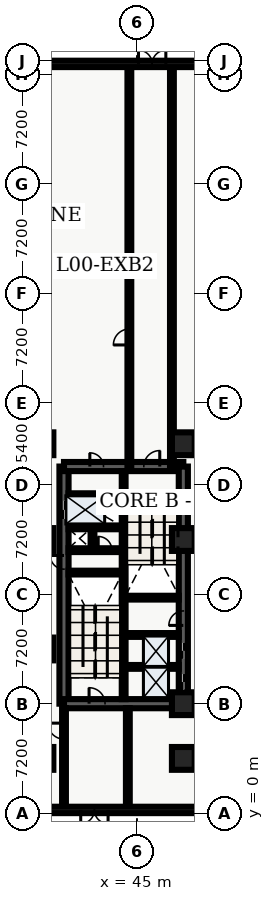
"""IFC4 building model, lengths in metres.
Left out: names, types, materials, properties, quantities, classifications, styles, units other than length and angle.
Written with IfcOpenShell. Run it as: python <this file> out.ifc"""

import sys

from ifc_helpers import new_model, entity, si_unit, converted_unit, direction, frame, origin_with_axes, origin_2d_with_axis, place, context, subcontext, project, spatial, polyline, rectangle, outline, extrude, element, fill, save


model = new_model("IFC4")
c1 = context("Model", 3, precision=1e-05, world=origin_with_axes(), true_north=direction((0.0, 1.0)))
c2 = subcontext(c1, "Body", "Model", "MODEL_VIEW")
j1 = project(units=[si_unit("LENGTHUNIT", "METRE"), converted_unit("PLANEANGLEUNIT", "DEGREE", entity("IfcPlaneAngleMeasure", 0.017), si_unit("PLANEANGLEUNIT", "RADIAN"), dimensions=[0, 0, 0, 0, 0, 0, 0])], contexts=[c1])
p1 = place(None, origin_with_axes())
s1 = spatial("IfcSite", under=j1, at=p1, CompositionType="ELEMENT")
p2 = place(p1, origin_with_axes())
s2 = spatial("IfcBuilding", under=s1, at=p2, CompositionType="ELEMENT")
p3 = place(p2, origin_with_axes())
s3 = spatial("IfcBuildingStorey", under=s2, at=p3, CompositionType="ELEMENT", Elevation=0.0)
p4 = place(p3, frame((40.2, 7.2, 0.0), z_axis=(0.0, 0.0, 1.0), x_axis=(0.0, 1.0, 0.0)))
e1 = element("IfcWall", 1, at=p4, inside=s3, PredefinedType="SHEAR", context=c2, shape_type="SweptSolid", body=[
    extrude(outline(polyline([(0.0, -0.3), (15.6, -0.3), (15.6, 0.3), (0.0, 0.3), (0.0, -0.3)])), origin_with_axes(), (0.0, 0.0, 1.0), 5.46),
])
p5 = place(p4, frame((12.75, 0.0, 0.0), z_axis=(0.0, 0.0, 1.0), x_axis=(1.0, 0.0, 0.0)))
e2 = element("IfcOpeningElement", 2, at=p5, cuts=e1, PredefinedType="OPENING", context=c2, shape_type="SweptSolid", body=[
    extrude(rectangle(XDim=1.2, YDim=0.62, at=origin_2d_with_axis()), origin_with_axes(), (0.0, 0.0, 1.0), 2.15),
])
p6 = place(p4, frame((9.3, 0.0, 0.0), z_axis=(0.0, 0.0, 1.0), x_axis=(1.0, 0.0, 0.0)))
e3 = element("IfcOpeningElement", 3, at=p6, cuts=e1, PredefinedType="OPENING", context=c2, shape_type="SweptSolid", body=[
    extrude(rectangle(XDim=0.9, YDim=0.62, at=origin_2d_with_axis()), origin_with_axes(), (0.0, 0.0, 1.0), 2.15),
])
p7 = place(p3, frame((40.2, 7.2, 0.0), z_axis=(0.0, 0.0, 1.0), x_axis=(1.0, 0.0, 0.0)))
e4 = element("IfcWall", 4, at=p7, inside=s3, PredefinedType="SHEAR", context=c2, shape_type="SweptSolid", body=[
    extrude(outline(polyline([(0.0, -0.3), (7.85, -0.3), (7.85, 0.3), (0.0, 0.3), (0.0, -0.3)])), origin_with_axes(), (0.0, 0.0, 1.0), 5.46),
])
p8 = place(p7, frame((2.175, 0.0, 0.0), z_axis=(0.0, 0.0, 1.0), x_axis=(1.0, 0.0, 0.0)))
e5 = element("IfcOpeningElement", 5, at=p8, cuts=e4, PredefinedType="OPENING", context=c2, shape_type="SweptSolid", body=[
    extrude(rectangle(XDim=1.05, YDim=0.62, at=origin_2d_with_axis()), origin_with_axes(), (0.0, 0.0, 1.0), 2.15),
])
p9 = place(p3, frame((40.2, 22.8, 0.0), z_axis=(0.0, 0.0, 1.0), x_axis=(1.0, 0.0, 0.0)))
e6 = element("IfcWall", 6, at=p9, inside=s3, PredefinedType="SHEAR", context=c2, shape_type="SweptSolid", body=[
    extrude(outline(polyline([(0.0, -0.3), (7.85, -0.3), (7.85, 0.3), (0.0, 0.3), (0.0, -0.3)])), origin_with_axes(), (0.0, 0.0, 1.0), 5.46),
])
p10 = place(p9, frame((5.775, 0.0, 0.0), z_axis=(0.0, 0.0, 1.0), x_axis=(1.0, 0.0, 0.0)))
e7 = element("IfcOpeningElement", 7, at=p10, cuts=e6, PredefinedType="OPENING", context=c2, shape_type="SweptSolid", body=[
    extrude(rectangle(XDim=1.05, YDim=0.62, at=origin_2d_with_axis()), origin_with_axes(), (0.0, 0.0, 1.0), 2.15),
])
p11 = place(p9, frame((2.15, 0.0, 0.0), z_axis=(0.0, 0.0, 1.0), x_axis=(1.0, 0.0, 0.0)))
e8 = element("IfcOpeningElement", 8, at=p11, cuts=e6, PredefinedType="OPENING", context=c2, shape_type="SweptSolid", body=[
    extrude(rectangle(XDim=0.9, YDim=0.62, at=origin_2d_with_axis()), origin_with_axes(), (0.0, 0.0, 1.0), 2.15),
])
p12 = place(p3, frame((48.05, 7.2, 0.0), z_axis=(0.0, 0.0, 1.0), x_axis=(0.0, 1.0, 0.0)))
e9 = element("IfcWall", 9, at=p12, inside=s3, PredefinedType="SHEAR", context=c2, shape_type="SweptSolid", body=[
    extrude(outline(polyline([(0.0, -0.3), (15.6, -0.3), (15.6, 0.3), (0.0, 0.3), (0.0, -0.3)])), origin_with_axes(), (0.0, 0.0, 1.0), 5.46),
])
p13 = place(p12, frame((1.425, 0.0, 0.0), z_axis=(0.0, 0.0, 1.0), x_axis=(1.0, 0.0, 0.0)))
e10 = element("IfcOpeningElement", 10, at=p13, cuts=e9, PredefinedType="OPENING", context=c2, shape_type="SweptSolid", body=[
    extrude(rectangle(XDim=1.05, YDim=0.62, at=origin_2d_with_axis()), origin_with_axes(), (0.0, 0.0, 1.0), 2.15),
])
p14 = place(p12, frame((3.475, 0.0, 0.0), z_axis=(0.0, 0.0, 1.0), x_axis=(1.0, 0.0, 0.0)))
e11 = element("IfcOpeningElement", 11, at=p14, cuts=e9, PredefinedType="OPENING", context=c2, shape_type="SweptSolid", body=[
    extrude(rectangle(XDim=1.05, YDim=0.62, at=origin_2d_with_axis()), origin_with_axes(), (0.0, 0.0, 1.0), 2.15),
])
p15 = place(p12, frame((5.625, 0.0, 0.0), z_axis=(0.0, 0.0, 1.0), x_axis=(1.0, 0.0, 0.0)))
e12 = element("IfcOpeningElement", 12, at=p15, cuts=e9, PredefinedType="OPENING", context=c2, shape_type="SweptSolid", body=[
    extrude(rectangle(XDim=0.95, YDim=0.62, at=origin_2d_with_axis()), origin_with_axes(), (0.0, 0.0, 1.0), 2.15),
])
p16 = place(p3, frame((44.125, 7.5, 0.0), z_axis=(0.0, 0.0, 1.0), x_axis=(0.0, 1.0, 0.0)))
e13 = element("IfcWall", 13, at=p16, inside=s3, PredefinedType="SHEAR", context=c2, shape_type="SweptSolid", body=[
    extrude(outline(polyline([(0.0, -0.125), (15.0, -0.125), (15.0, 0.125), (0.0, 0.125), (0.0, -0.125)])), origin_with_axes(), (0.0, 0.0, 1.0), 5.46),
])
for number, where, z_axis, x_axis in (
    (14, (40.5, 15.825, 0.0), (0.0, 0.0, 1.0), (1.0, 0.0, 0.0)),
    (15, (44.25, 14.175, 0.0), (0.0, 0.0, 1.0), (1.0, 0.0, 0.0)),
):
    element("IfcWall", number, at=place(p3, frame(where, z_axis=z_axis, x_axis=x_axis)), inside=s3, PredefinedType="SHEAR", context=c2, shape_type="SweptSolid", body=[
        extrude(outline(polyline([(0.0, -0.125), (3.5, -0.125), (3.5, 0.125), (0.0, 0.125), (0.0, -0.125)])), origin_with_axes(), (0.0, 0.0, 1.0), 5.46),
    ])
p17 = place(p3, frame((40.5, 17.3, 0.0), z_axis=(0.0, 0.0, 1.0), x_axis=(1.0, 0.0, 0.0)))
e16 = element("IfcWall", 16, at=p17, inside=s3, PredefinedType="SOLIDWALL", context=c2, shape_type="SweptSolid", body=[
    extrude(outline(polyline([(0.0, -0.125), (3.5, -0.125), (3.5, 0.125), (0.0, 0.125), (0.0, -0.125)])), origin_with_axes(), (0.0, 0.0, 1.0), 3.6),
])
p18 = place(p17, frame((2.4, 0.0, 0.0), z_axis=(0.0, 0.0, 1.0), x_axis=(1.0, 0.0, 0.0)))
e17 = element("IfcOpeningElement", 17, at=p18, cuts=e16, PredefinedType="OPENING", context=c2, shape_type="SweptSolid", body=[
    extrude(rectangle(XDim=0.9, YDim=0.27, at=origin_2d_with_axis()), origin_with_axes(), (0.0, 0.0, 1.0), 2.15),
])
p19 = place(p3, frame((40.5, 18.8, 0.0), z_axis=(0.0, 0.0, 1.0), x_axis=(1.0, 0.0, 0.0)))
e18 = element("IfcWall", 18, at=p19, inside=s3, PredefinedType="SOLIDWALL", context=c2, shape_type="SweptSolid", body=[
    extrude(outline(polyline([(0.0, -0.125), (3.5, -0.125), (3.5, 0.125), (0.0, 0.125), (0.0, -0.125)])), origin_with_axes(), (0.0, 0.0, 1.0), 3.6),
])
p20 = place(p3, frame((42.075, 17.43, 0.0), z_axis=(0.0, 0.0, 1.0), x_axis=(0.0, 1.0, 0.0)))
e19 = element("IfcWall", 19, at=p20, inside=s3, PredefinedType="SOLIDWALL", context=c2, shape_type="SweptSolid", body=[
    extrude(outline(polyline([(0.0, -0.125), (1.24, -0.125), (1.24, 0.125), (0.0, 0.125), (0.0, -0.125)])), origin_with_axes(), (0.0, 0.0, 1.0), 3.6),
])
p21 = place(p3, frame((40.2, 0.42, 0.0), z_axis=(0.0, 0.0, 1.0), x_axis=(0.0, 1.0, 0.0)))
e20 = element("IfcWall", 20, at=p21, inside=s3, PredefinedType="SOLIDWALL", context=c2, shape_type="SweptSolid", body=[
    extrude(outline(polyline([(0.0, -0.125), (6.48, -0.125), (6.48, 0.125), (0.0, 0.125), (0.0, -0.125)])), origin_with_axes(), (0.0, 0.0, 1.0), 3.6),
])
p22 = place(p21, frame((4.975, 0.0, 0.0), z_axis=(0.0, 0.0, 1.0), x_axis=(1.0, 0.0, 0.0)))
e21 = element("IfcOpeningElement", 21, at=p22, cuts=e20, PredefinedType="OPENING", context=c2, shape_type="SweptSolid", body=[
    extrude(rectangle(XDim=1.05, YDim=0.27, at=origin_2d_with_axis()), origin_with_axes(), (0.0, 0.0, 1.0), 2.15),
])
p23 = place(p3, frame((44.4, 0.42, 0.0), z_axis=(0.0, 0.0, 1.0), x_axis=(0.0, 1.0, 0.0)))
e22 = element("IfcWall", 22, at=p23, inside=s3, PredefinedType="SOLIDWALL", context=c2, shape_type="SweptSolid", body=[
    extrude(outline(polyline([(0.0, -0.125), (6.48, -0.125), (6.48, 0.125), (0.0, 0.125), (0.0, -0.125)])), origin_with_axes(), (0.0, 0.0, 1.0), 3.6),
])
for number, where, z_axis, x_axis in (
    (23, (38.75, 3.6, 0.0), (0.0, 0.0, 1.0), (1.0, 0.0, 0.0)),
    (24, (38.75, 10.8, 0.0), (0.0, 0.0, 1.0), (1.0, 0.0, 0.0)),
    (25, (38.75, 18.0, 0.0), (0.0, 0.0, 1.0), (1.0, 0.0, 0.0)),
    (26, (38.75, 24.3, 0.0), (0.0, 0.0, 1.0), (1.0, 0.0, 0.0)),
    (27, (48.05, 3.6, 0.0), (0.0, 0.0, 1.0), (1.0, 0.0, 0.0)),
    (28, (48.05, 7.2, 0.0), (0.0, 0.0, 1.0), (1.0, 0.0, 0.0)),
    (29, (48.05, 18.0, 0.0), (0.0, 0.0, 1.0), (1.0, 0.0, 0.0)),
    (30, (48.05, 24.3, 0.0), (0.0, 0.0, 1.0), (1.0, 0.0, 0.0)),
):
    element("IfcColumn", number, at=place(p3, frame(where, z_axis=z_axis, x_axis=x_axis)), inside=s3, PredefinedType="COLUMN", context=c2, shape_type="SweptSolid", body=[
        extrude(rectangle(XDim=1.5, YDim=1.5, at=origin_2d_with_axis()), origin_with_axes(), (0.0, 0.0, 1.0), 5.7),
    ])
p24 = place(p3, frame((40.5, 20.96, 0.0), z_axis=(0.0, 0.0, 1.0), x_axis=(1.0, 0.0, 0.0)))
e31 = element("IfcWall", 31, at=p24, inside=s3, PredefinedType="PARTITIONING", context=c2, shape_type="SweptSolid", body=[
    extrude(outline(polyline([(0.0, -0.08), (3.5, -0.08), (3.5, 0.08), (0.0, 0.08), (0.0, -0.08)])), origin_with_axes(), (0.0, 0.0, 1.0), 3.2),
])
for number, where, z_axis, x_axis in (
    (32, (44.25, 9.62, 0.0), (0.0, 0.0, 1.0), (1.0, 0.0, 0.0)),
    (33, (44.25, 11.72, 0.0), (0.0, 0.0, 1.0), (1.0, 0.0, 0.0)),
):
    element("IfcWall", number, at=place(p3, frame(where, z_axis=z_axis, x_axis=x_axis)), inside=s3, PredefinedType="SOLIDWALL", context=c2, shape_type="SweptSolid", body=[
        extrude(outline(polyline([(0.0, -0.125), (3.5, -0.125), (3.5, 0.125), (0.0, 0.125), (0.0, -0.125)])), origin_with_axes(), (0.0, 0.0, 1.0), 3.2),
    ])
p25 = place(p3, frame((44.5, 22.8, 0.0), z_axis=(0.0, 0.0, 1.0), x_axis=(0.0, 1.0, 0.0)))
e34 = element("IfcWall", 34, at=p25, inside=s3, PredefinedType="SOLIDWALL", context=c2, shape_type="SweptSolid", body=[
    extrude(outline(polyline([(0.0, -0.125), (26.28, -0.125), (26.28, 0.125), (0.0, 0.125), (0.0, -0.125)])), origin_with_axes(), (0.0, 0.0, 1.0), 3.2),
])
p26 = place(p25, frame((8.525, 0.0, 0.0), z_axis=(0.0, 0.0, 1.0), x_axis=(1.0, 0.0, 0.0)))
e35 = element("IfcOpeningElement", 35, at=p26, cuts=e34, PredefinedType="OPENING", context=c2, shape_type="SweptSolid", body=[
    extrude(rectangle(XDim=1.05, YDim=0.27, at=origin_2d_with_axis()), origin_with_axes(), (0.0, 0.0, 1.0), 2.15),
])
p27 = place(p3, frame((47.3, 22.8, 0.0), z_axis=(0.0, 0.0, 1.0), x_axis=(0.0, 1.0, 0.0)))
e36 = element("IfcWall", 36, at=p27, inside=s3, PredefinedType="SOLIDWALL", context=c2, shape_type="SweptSolid", body=[
    extrude(outline(polyline([(0.0, -0.125), (26.28, -0.125), (26.28, 0.125), (0.0, 0.125), (0.0, -0.125)])), origin_with_axes(), (0.0, 0.0, 1.0), 3.2),
])
p28 = place(p3, frame((48.35, 24.3, 0.0), z_axis=(0.0, 0.0, 1.0), x_axis=(1.0, 0.0, 0.0)))
e37 = element("IfcWall", 37, at=p28, inside=s3, PredefinedType="PARTITIONING", context=c2, shape_type="SweptSolid", body=[
    extrude(outline(polyline([(0.0, -0.05), (19.63, -0.05), (19.63, 0.05), (0.0, 0.05), (0.0, -0.05)])), origin_with_axes(), (0.0, 0.0, 1.0), 3.2),
])
p29 = place(p28, frame((8.8, 0.0, 0.0), z_axis=(0.0, 0.0, 1.0), x_axis=(1.0, 0.0, 0.0)))
e38 = element("IfcOpeningElement", 38, at=p29, cuts=e37, PredefinedType="OPENING", context=c2, shape_type="SweptSolid", body=[
    extrude(rectangle(XDim=1.6, YDim=0.12, at=origin_2d_with_axis()), origin_with_axes(), (0.0, 0.0, 1.0), 2.2),
])
p30 = place(p3, frame((67.98, 0.21, 0.0), z_axis=(0.0, 0.0, 1.0), x_axis=(-1.0, 0.0, 0.0)))
e39 = element("IfcWall", 39, at=p30, inside=s3, PredefinedType="SOLIDWALL", context=c2, shape_type="SweptSolid", body=[
    extrude(outline(polyline([(0.0, -0.21), (67.98, -0.21), (67.98, 0.21), (0.0, 0.21), (0.0, -0.21)])), origin_with_axes(), (0.0, 0.0, 1.0), 5.46),
])
p31 = place(p30, frame((64.88, 0.0, 0.0), z_axis=(0.0, 0.0, 1.0), x_axis=(1.0, 0.0, 0.0)))
e40 = element("IfcOpeningElement", 40, at=p31, cuts=e39, PredefinedType="OPENING", context=c2, shape_type="SweptSolid", body=[
    extrude(rectangle(XDim=1.8, YDim=0.44, at=origin_2d_with_axis()), origin_with_axes(), (0.0, 0.0, 1.0), 2.2),
])
p32 = place(p30, frame((54.18, 0.0, 0.0), z_axis=(0.0, 0.0, 1.0), x_axis=(1.0, 0.0, 0.0)))
e41 = element("IfcOpeningElement", 41, at=p32, cuts=e39, PredefinedType="OPENING", context=c2, shape_type="SweptSolid", body=[
    extrude(rectangle(XDim=1.8, YDim=0.44, at=origin_2d_with_axis()), origin_with_axes(), (0.0, 0.0, 1.0), 2.2),
])
p33 = place(p30, frame((48.18, 0.0, 0.0), z_axis=(0.0, 0.0, 1.0), x_axis=(1.0, 0.0, 0.0)))
e42 = element("IfcOpeningElement", 42, at=p33, cuts=e39, PredefinedType="OPENING", context=c2, shape_type="SweptSolid", body=[
    extrude(rectangle(XDim=1.8, YDim=0.44, at=origin_2d_with_axis()), origin_with_axes(), (0.0, 0.0, 1.0), 2.2),
])
p34 = place(p30, frame((44.98, 0.0, 0.0), z_axis=(0.0, 0.0, 1.0), x_axis=(1.0, 0.0, 0.0)))
e43 = element("IfcOpeningElement", 43, at=p34, cuts=e39, PredefinedType="OPENING", context=c2, shape_type="SweptSolid", body=[
    extrude(rectangle(XDim=2.0, YDim=0.44, at=origin_2d_with_axis()), origin_with_axes(), (0.0, 0.0, 1.0), 2.4),
])
p35 = place(p30, frame((34.98, 0.0, 0.0), z_axis=(0.0, 0.0, 1.0), x_axis=(1.0, 0.0, 0.0)))
e44 = element("IfcOpeningElement", 44, at=p35, cuts=e39, PredefinedType="OPENING", context=c2, shape_type="SweptSolid", body=[
    extrude(rectangle(XDim=2.0, YDim=0.44, at=origin_2d_with_axis()), origin_with_axes(), (0.0, 0.0, 1.0), 2.4),
])
p36 = place(p30, frame((25.78, 0.0, 0.0), z_axis=(0.0, 0.0, 1.0), x_axis=(1.0, 0.0, 0.0)))
e45 = element("IfcOpeningElement", 45, at=p36, cuts=e39, PredefinedType="OPENING", context=c2, shape_type="SweptSolid", body=[
    extrude(rectangle(XDim=1.8, YDim=0.44, at=origin_2d_with_axis()), origin_with_axes(), (0.0, 0.0, 1.0), 2.2),
])
p37 = place(p30, frame((12.58, 0.0, 0.0), z_axis=(0.0, 0.0, 1.0), x_axis=(1.0, 0.0, 0.0)))
e46 = element("IfcOpeningElement", 46, at=p37, cuts=e39, PredefinedType="OPENING", context=c2, shape_type="SweptSolid", body=[
    extrude(rectangle(XDim=2.0, YDim=0.44, at=origin_2d_with_axis()), origin_with_axes(), (0.0, 0.0, 1.0), 2.4),
])
p38 = place(p30, frame((4.48, 0.0, 0.0), z_axis=(0.0, 0.0, 1.0), x_axis=(1.0, 0.0, 0.0)))
e47 = element("IfcOpeningElement", 47, at=p38, cuts=e39, PredefinedType="OPENING", context=c2, shape_type="SweptSolid", body=[
    extrude(rectangle(XDim=2.0, YDim=0.44, at=origin_2d_with_axis()), origin_with_axes(), (0.0, 0.0, 1.0), 2.4),
])
p39 = place(p3, frame((0.42, 49.29, 0.0), z_axis=(0.0, 0.0, 1.0), x_axis=(1.0, 0.0, 0.0)))
e48 = element("IfcWall", 48, at=p39, inside=s3, PredefinedType="SOLIDWALL", context=c2, shape_type="SweptSolid", body=[
    extrude(outline(polyline([(0.0, -0.21), (53.58, -0.21), (53.58, 0.21), (0.0, 0.21), (0.0, -0.21)])), origin_with_axes(), (0.0, 0.0, 1.0), 5.46),
])
p40 = place(p39, frame((15.58, 0.0, 0.0), z_axis=(0.0, 0.0, 1.0), x_axis=(1.0, 0.0, 0.0)))
e49 = element("IfcOpeningElement", 49, at=p40, cuts=e48, PredefinedType="OPENING", context=c2, shape_type="SweptSolid", body=[
    extrude(rectangle(XDim=1.8, YDim=0.44, at=origin_2d_with_axis()), origin_with_axes(), (0.0, 0.0, 1.0), 2.2),
])
p41 = place(p39, frame((31.58, 0.0, 0.0), z_axis=(0.0, 0.0, 1.0), x_axis=(1.0, 0.0, 0.0)))
e50 = element("IfcOpeningElement", 50, at=p41, cuts=e48, PredefinedType="OPENING", context=c2, shape_type="SweptSolid", body=[
    extrude(rectangle(XDim=1.8, YDim=0.44, at=origin_2d_with_axis()), origin_with_axes(), (0.0, 0.0, 1.0), 2.2),
])
p42 = place(p39, frame((45.58, 0.0, 0.0), z_axis=(0.0, 0.0, 1.0), x_axis=(1.0, 0.0, 0.0)))
e51 = element("IfcOpeningElement", 51, at=p42, cuts=e48, PredefinedType="OPENING", context=c2, shape_type="SweptSolid", body=[
    extrude(rectangle(XDim=1.8, YDim=0.44, at=origin_2d_with_axis()), origin_with_axes(), (0.0, 0.0, 1.0), 2.2),
])
p43 = place(p39, frame((2.23, 0.0, 0.0), z_axis=(0.0, 0.0, 1.0), x_axis=(1.0, 0.0, 0.0)))
e52 = element("IfcOpeningElement", 52, at=p43, cuts=e48, PredefinedType="OPENING", context=c2, shape_type="SweptSolid", body=[
    extrude(rectangle(XDim=3.6, YDim=0.44, at=origin_2d_with_axis()), origin_with_axes(), (0.0, 0.0, 1.0), 4.2),
])
p44 = place(p39, frame((6.43, 0.0, 0.0), z_axis=(0.0, 0.0, 1.0), x_axis=(1.0, 0.0, 0.0)))
e53 = element("IfcOpeningElement", 53, at=p44, cuts=e48, PredefinedType="OPENING", context=c2, shape_type="SweptSolid", body=[
    extrude(rectangle(XDim=3.6, YDim=0.44, at=origin_2d_with_axis()), origin_with_axes(), (0.0, 0.0, 1.0), 4.2),
])
p45 = place(p12, frame((1.425, 0.0, 0.0), z_axis=(0.0, 0.0, 1.0), x_axis=(1.0, 0.0, 0.0)))
e54 = element("IfcDoor", 54, at=p45, inside=s3, OperationType="SLIDING_TO_LEFT", PredefinedType="DOOR", context=c2, shape_type="SweptSolid", body=[
    extrude(rectangle(XDim=1.05, YDim=0.09, at=origin_2d_with_axis()), origin_with_axes(), (0.0, 0.0, 1.0), 2.15),
])
fill(e10, e54)
p46 = place(p12, frame((3.475, 0.0, 0.0), z_axis=(0.0, 0.0, 1.0), x_axis=(1.0, 0.0, 0.0)))
e55 = element("IfcDoor", 55, at=p46, inside=s3, OperationType="SLIDING_TO_RIGHT", PredefinedType="DOOR", context=c2, shape_type="SweptSolid", body=[
    extrude(rectangle(XDim=1.05, YDim=0.09, at=origin_2d_with_axis()), origin_with_axes(), (0.0, 0.0, 1.0), 2.15),
])
fill(e11, e55)
p47 = place(p4, frame((12.75, 0.0, 0.0), z_axis=(0.0, 0.0, 1.0), x_axis=(1.0, 0.0, 0.0)))
e56 = element("IfcDoor", 56, at=p47, inside=s3, OperationType="DOUBLE_DOOR_SLIDING", PredefinedType="DOOR", context=c2, shape_type="SweptSolid", body=[
    extrude(rectangle(XDim=1.2, YDim=0.09, at=origin_2d_with_axis()), origin_with_axes(), (0.0, 0.0, 1.0), 2.15),
])
fill(e2, e56)
p48 = place(p4, frame((9.3, 0.0, 0.0), z_axis=(0.0, 0.0, 1.0), x_axis=(1.0, 0.0, 0.0)))
e57 = element("IfcDoor", 57, at=p48, inside=s3, OperationType="SINGLE_SWING_RIGHT", PredefinedType="DOOR", context=c2, shape_type="SweptSolid", body=[
    extrude(rectangle(XDim=0.9, YDim=0.09, at=origin_2d_with_axis()), origin_with_axes(), (0.0, 0.0, 1.0), 2.15),
])
fill(e3, e57)
p49 = place(p17, frame((2.4, 0.0, 0.0), z_axis=(0.0, 0.0, 1.0), x_axis=(1.0, 0.0, 0.0)))
e58 = element("IfcDoor", 58, at=p49, inside=s3, OperationType="SINGLE_SWING_LEFT", PredefinedType="DOOR", context=c2, shape_type="SweptSolid", body=[
    extrude(rectangle(XDim=0.9, YDim=0.09, at=origin_2d_with_axis()), origin_with_axes(), (0.0, 0.0, 1.0), 2.15),
])
fill(e17, e58)
p50 = place(p7, frame((2.175, 0.0, 0.0), z_axis=(0.0, 0.0, 1.0), x_axis=(1.0, 0.0, 0.0)))
e59 = element("IfcDoor", 59, at=p50, inside=s3, OperationType="SINGLE_SWING_LEFT", PredefinedType="DOOR", context=c2, shape_type="SweptSolid", body=[
    extrude(rectangle(XDim=1.05, YDim=0.09, at=origin_2d_with_axis()), origin_with_axes(), (0.0, 0.0, 1.0), 2.15),
])
fill(e5, e59)
p51 = place(p9, frame((5.775, 0.0, 0.0), z_axis=(0.0, 0.0, 1.0), x_axis=(1.0, 0.0, 0.0)))
e60 = element("IfcDoor", 60, at=p51, inside=s3, OperationType="SINGLE_SWING_RIGHT", PredefinedType="DOOR", context=c2, shape_type="SweptSolid", body=[
    extrude(rectangle(XDim=1.05, YDim=0.09, at=origin_2d_with_axis()), origin_with_axes(), (0.0, 0.0, 1.0), 2.15),
])
fill(e7, e60)
p52 = place(p21, frame((4.975, 0.0, 0.0), z_axis=(0.0, 0.0, 1.0), x_axis=(1.0, 0.0, 0.0)))
e61 = element("IfcDoor", 61, at=p52, inside=s3, OperationType="SINGLE_SWING_RIGHT", PredefinedType="DOOR", context=c2, shape_type="SweptSolid", body=[
    extrude(rectangle(XDim=1.05, YDim=0.09, at=origin_2d_with_axis()), origin_with_axes(), (0.0, 0.0, 1.0), 2.15),
])
fill(e21, e61)
p53 = place(p9, frame((2.15, 0.0, 0.0), z_axis=(0.0, 0.0, 1.0), x_axis=(1.0, 0.0, 0.0)))
e62 = element("IfcDoor", 62, at=p53, inside=s3, OperationType="SINGLE_SWING_LEFT", PredefinedType="DOOR", context=c2, shape_type="SweptSolid", body=[
    extrude(rectangle(XDim=0.9, YDim=0.09, at=origin_2d_with_axis()), origin_with_axes(), (0.0, 0.0, 1.0), 2.15),
])
fill(e8, e62)
p54 = place(p12, frame((5.625, 0.0, 0.0), z_axis=(0.0, 0.0, 1.0), x_axis=(1.0, 0.0, 0.0)))
e63 = element("IfcDoor", 63, at=p54, inside=s3, OperationType="SINGLE_SWING_LEFT", PredefinedType="DOOR", context=c2, shape_type="SweptSolid", body=[
    extrude(rectangle(XDim=0.95, YDim=0.09, at=origin_2d_with_axis()), origin_with_axes(), (0.0, 0.0, 1.0), 2.15),
])
fill(e12, e63)
p55 = place(p25, frame((8.525, 0.0, 0.0), z_axis=(0.0, 0.0, 1.0), x_axis=(1.0, 0.0, 0.0)))
e64 = element("IfcDoor", 64, at=p55, inside=s3, OperationType="SINGLE_SWING_LEFT", PredefinedType="DOOR", context=c2, shape_type="SweptSolid", body=[
    extrude(rectangle(XDim=1.05, YDim=0.09, at=origin_2d_with_axis()), origin_with_axes(), (0.0, 0.0, 1.0), 2.15),
])
fill(e35, e64)
p56 = place(p30, frame((25.78, 0.0, 0.0), z_axis=(0.0, 0.0, 1.0), x_axis=(1.0, 0.0, 0.0)))
e65 = element("IfcDoor", 65, at=p56, inside=s3, OperationType="DOUBLE_DOOR_SINGLE_SWING", PredefinedType="DOOR", context=c2, shape_type="SweptSolid", body=[
    extrude(rectangle(XDim=1.8, YDim=0.09, at=origin_2d_with_axis()), origin_with_axes(), (0.0, 0.0, 1.0), 2.2),
])
fill(e45, e65)
p57 = place(p39, frame((45.58, 0.0, 0.0), z_axis=(0.0, 0.0, 1.0), x_axis=(1.0, 0.0, 0.0)))
e66 = element("IfcDoor", 66, at=p57, inside=s3, OperationType="DOUBLE_DOOR_SINGLE_SWING", PredefinedType="DOOR", context=c2, shape_type="SweptSolid", body=[
    extrude(rectangle(XDim=1.8, YDim=0.09, at=origin_2d_with_axis()), origin_with_axes(), (0.0, 0.0, 1.0), 2.2),
])
fill(e51, e66)
save(model, sys.argv[1])
